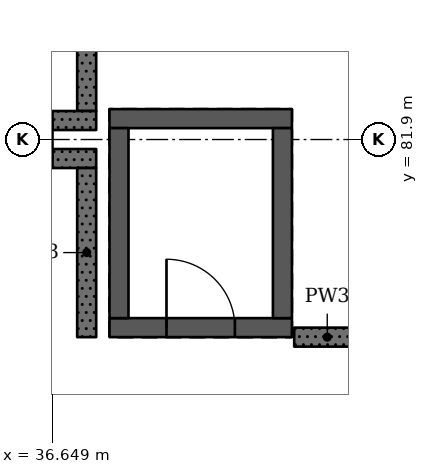
"""IFC4 building model, lengths in metres.
Left out: names, types, materials, properties, quantities, classifications, styles, units other than length and angle.
Written with IfcOpenShell. Run it as: python <this file> out.ifc"""

import sys

from ifc_helpers import new_model, si_unit, direction, frame, frame_2d, origin, place, context, subcontext, project, spatial, rectangle, extrude, element, fill, save


model = new_model("IFC4")
c1 = context("Model", 3, precision=1e-05, world=origin(), true_north=direction((0.0, 1.0)))
c2 = subcontext(c1, "Body", "Model", "MODEL_VIEW")
j1 = project(units=[si_unit("LENGTHUNIT", "METRE"), si_unit("PLANEANGLEUNIT", "RADIAN")], contexts=[c1])
p1 = place(None, origin())
s1 = spatial("IfcSite", under=j1, at=p1, CompositionType="ELEMENT")
p2 = place(p1, origin())
s2 = spatial("IfcBuilding", under=s1, at=p2, CompositionType="ELEMENT")
p3 = place(p2, frame((0.0, 0.0, 24.57)))
s3 = spatial("IfcBuildingStorey", under=s2, at=p3, CompositionType="ELEMENT", Elevation=24.57)
p4 = place(p3, frame((39.8, 79.425, 0.0), z_axis=(0.0, 0.0, 1.0), x_axis=(-1.0, 0.0, 0.0)))
e1 = element("IfcWall", 1, at=p4, inside=s3, PredefinedType="SHEAR", context=c2, shape_type="SweptSolid", body=[
    extrude(rectangle(XDim=2.4, YDim=0.25, at=frame_2d((1.2, 0.0))), origin(), (0.0, 0.0, 1.0), 4.55),
])
p5 = place(p4, frame((0.75, 0.0, 0.0)))
e2 = element("IfcOpeningElement", 2, at=p5, cuts=e1, PredefinedType="OPENING", context=c2, shape_type="SweptSolid", body=[
    extrude(rectangle(XDim=0.9, YDim=2.1, at=frame_2d((0.45, 1.05))), frame((0.0, 0.135, 0.0), z_axis=(0.0, -1.0, 0.0), x_axis=(1.0, 0.0, 0.0)), (0.0, 0.0, 1.0), 0.27),
])
p6 = place(p3, frame((39.8, 82.175, 0.0), z_axis=(0.0, 0.0, 1.0), x_axis=(-1.0, 0.0, 0.0)))
e3 = element("IfcWall", 3, at=p6, inside=s3, PredefinedType="SHEAR", context=c2, shape_type="SweptSolid", body=[
    extrude(rectangle(XDim=2.4, YDim=0.25, at=frame_2d((1.2, 0.0))), origin(), (0.0, 0.0, 1.0), 4.55),
])
for number, where, z_axis, x_axis in (
    (4, (37.525, 82.05, 0.0), (0.0, 0.0, 1.0), (0.0, -1.0, 0.0)),
    (5, (39.675, 82.05, 0.0), (0.0, 0.0, 1.0), (0.0, -1.0, 0.0)),
):
    element("IfcWall", number, at=place(p3, frame(where, z_axis=z_axis, x_axis=x_axis)), inside=s3, PredefinedType="SHEAR", context=c2, shape_type="SweptSolid", body=[
        extrude(rectangle(XDim=2.5, YDim=0.25, at=frame_2d((1.25, 0.0))), origin(), (0.0, 0.0, 1.0), 4.55),
    ])
p7 = place(p3, frame((36.65, 81.65, 0.0), z_axis=(0.0, 0.0, 1.0), x_axis=(1.0, 0.0, 0.0)))
e6 = element("IfcWall", 6, at=p7, inside=s3, PredefinedType="SOLIDWALL", context=c2, shape_type="SweptSolid", body=[
    extrude(rectangle(XDim=0.575, YDim=0.25, at=frame_2d((0.288, 0.0))), origin(), (0.0, 0.0, 1.0), 4.35),
])
p8 = place(p3, frame((37.1, 81.525, 0.0), z_axis=(0.0, 0.0, 1.0), x_axis=(0.0, -1.0, 0.0)))
e7 = element("IfcWall", 7, at=p8, inside=s3, PredefinedType="SOLIDWALL", context=c2, shape_type="SweptSolid", body=[
    extrude(rectangle(XDim=2.225, YDim=0.25, at=frame_2d((1.112, 0.0))), origin(), (0.0, 0.0, 1.0), 4.35),
])
p9 = place(p3, frame((37.1, 89.275, 0.0), z_axis=(0.0, 0.0, 1.0), x_axis=(0.0, -1.0, 0.0)))
e8 = element("IfcWall", 8, at=p9, inside=s3, PredefinedType="SOLIDWALL", context=c2, shape_type="SweptSolid", body=[
    extrude(rectangle(XDim=7.0, YDim=0.25, at=frame_2d((3.5, 0.0))), origin(), (0.0, 0.0, 1.0), 4.35),
])
p10 = place(p3, frame((37.225, 82.15, 0.0), z_axis=(0.0, 0.0, 1.0), x_axis=(-1.0, 0.0, 0.0)))
e9 = element("IfcWall", 9, at=p10, inside=s3, PredefinedType="SOLIDWALL", context=c2, shape_type="SweptSolid", body=[
    extrude(rectangle(XDim=0.575, YDim=0.25, at=frame_2d((0.288, 0.0))), origin(), (0.0, 0.0, 1.0), 4.35),
])
p11 = place(p3, frame((40.7, 79.3, 0.0), z_axis=(0.0, 0.0, 1.0), x_axis=(-1.0, 0.0, 0.0)))
e10 = element("IfcWall", 10, at=p11, inside=s3, PredefinedType="SOLIDWALL", context=c2, shape_type="SweptSolid", body=[
    extrude(rectangle(XDim=0.87, YDim=0.25, at=frame_2d((0.435, 0.0))), origin(), (0.0, 0.0, 1.0), 4.35),
])
p12 = place(p5, origin())
e11 = element("IfcDoor", 11, at=p12, inside=s3, OperationType="SINGLE_SWING_RIGHT", PredefinedType="DOOR", context=c2, shape_type="SweptSolid", body=[
    extrude(rectangle(XDim=0.9, YDim=2.1, at=frame_2d((0.45, 1.05))), frame((0.0, 0.025, 0.0), z_axis=(0.0, -1.0, 0.0), x_axis=(1.0, 0.0, 0.0)), (0.0, 0.0, 1.0), 0.05),
])
fill(e2, e11)
save(model, sys.argv[1])
